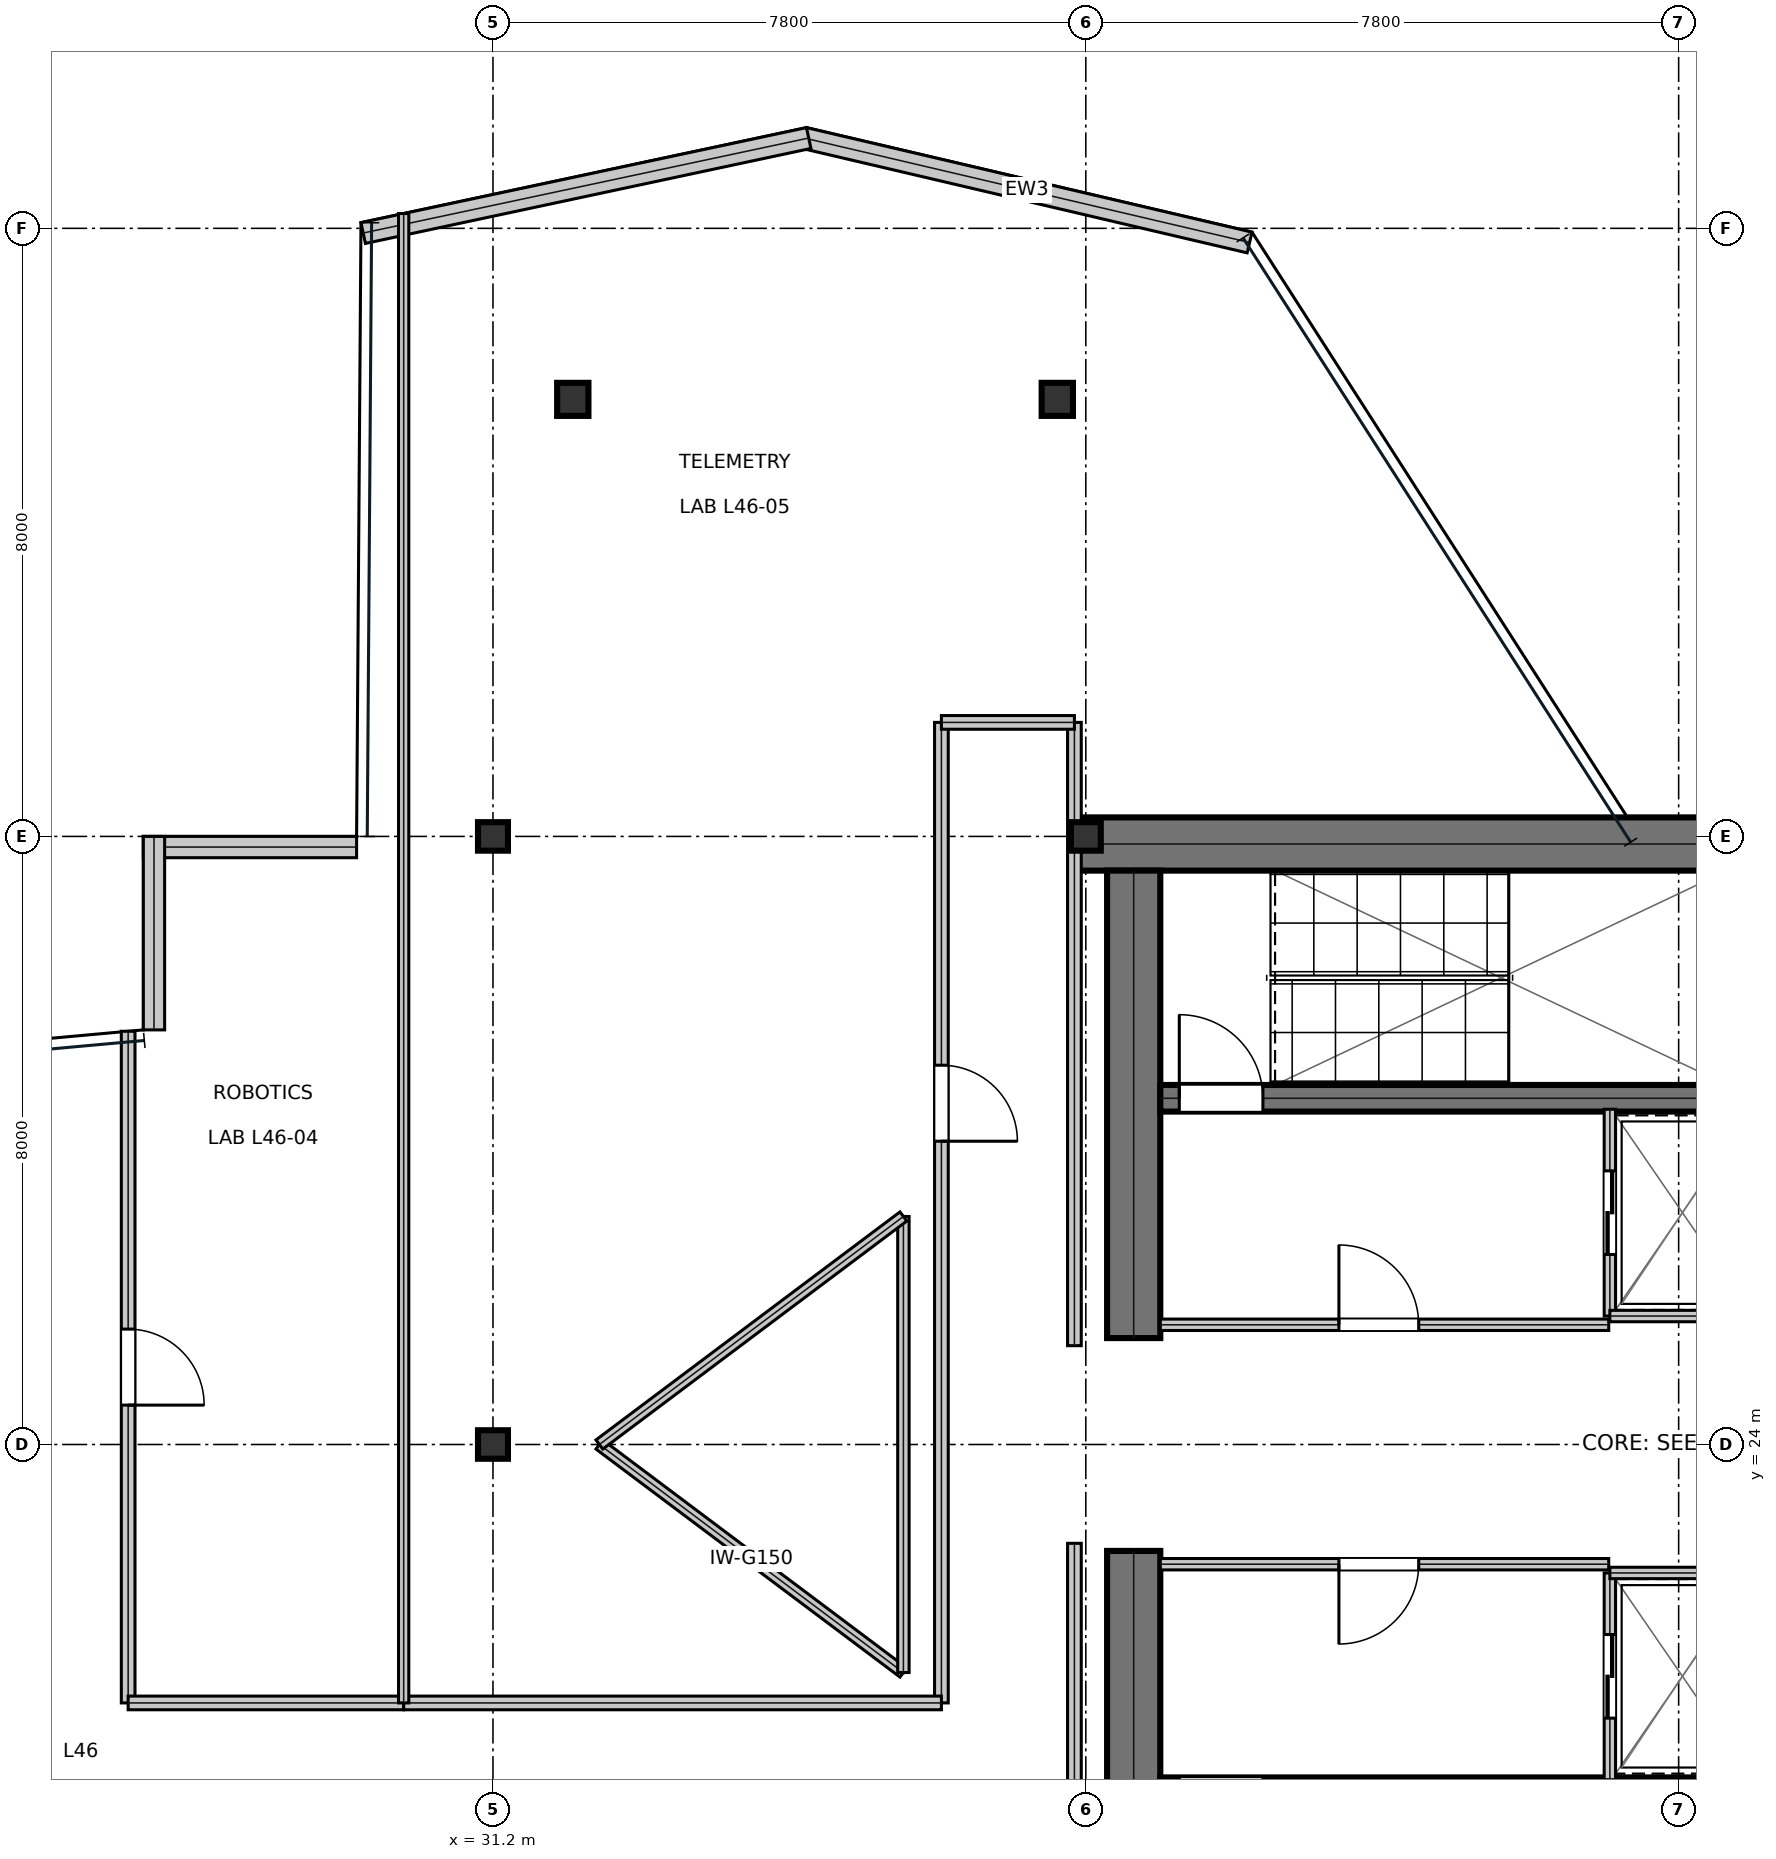
"""IFC4 building model, lengths in metres.
Left out: names, types, materials, properties, quantities, classifications, styles, units other than length and angle.
Written with IfcOpenShell. Run it as: python <this file> out.ifc"""

import sys

from ifc_helpers import new_model, si_unit, direction, frame, frame_2d, origin, origin_2d, place, context, subcontext, project, spatial, rectangle, i_section, extrude, element, fill, save


model = new_model("IFC4")
c1 = context("Model", 3, precision=1e-05, world=origin(), true_north=direction((0.0, 1.0)))
c2 = subcontext(c1, "Body", "Model", "MODEL_VIEW")
j1 = project(units=[si_unit("LENGTHUNIT", "METRE"), si_unit("PLANEANGLEUNIT", "RADIAN")], contexts=[c1])
p1 = place(None, origin())
s1 = spatial("IfcSite", under=j1, at=p1, CompositionType="ELEMENT")
p2 = place(p1, origin())
s2 = spatial("IfcBuilding", under=s1, at=p2, CompositionType="ELEMENT")
p3 = place(p2, frame((0.0, 0.0, 199.95)))
s3 = spatial("IfcBuildingStorey", under=s2, at=p3, CompositionType="ELEMENT", Elevation=199.95)
p4 = place(p3, frame((38.8, 31.9, 0.0), z_axis=(0.0, 0.0, 1.0), x_axis=(1.0, 0.0, 0.0)))
e1 = element("IfcWall", 1, at=p4, inside=s3, PredefinedType="SHEAR", context=c2, shape_type="SweptSolid", body=[
    extrude(rectangle(XDim=16.0, YDim=0.7, at=frame_2d((8.0, 0.0))), origin(), (0.0, 0.0, 1.0), 3.79),
])
for number, where, z_axis, x_axis in (
    (2, (39.63, 16.45, 0.0), (0.0, 0.0, 1.0), (0.0, 1.0, 0.0)),
    (3, (39.63, 25.4, 0.0), (0.0, 0.0, 1.0), (0.0, 1.0, 0.0)),
):
    element("IfcWall", number, at=place(p3, frame(where, z_axis=z_axis, x_axis=x_axis)), inside=s3, PredefinedType="SHEAR", context=c2, shape_type="SweptSolid", body=[
        extrude(rectangle(XDim=6.15, YDim=0.7, at=frame_2d((3.075, 0.0))), origin(), (0.0, 0.0, 1.0), 3.79),
    ])
p5 = place(p3, frame((39.98, 28.555, 0.0), z_axis=(0.0, 0.0, 1.0), x_axis=(1.0, 0.0, 0.0)))
e4 = element("IfcWall", 4, at=p5, inside=s3, PredefinedType="SHEAR", context=c2, shape_type="SweptSolid", body=[
    extrude(rectangle(XDim=7.71, YDim=0.35, at=frame_2d((3.855, 0.0))), origin(), (0.0, 0.0, 1.0), 3.79),
])
p6 = place(p5, frame((0.25, 0.0, 0.0)))
e5 = element("IfcOpeningElement", 5, at=p6, cuts=e4, PredefinedType="OPENING", context=c2, shape_type="SweptSolid", body=[
    extrude(rectangle(XDim=1.1, YDim=2.15, at=frame_2d((0.55, 1.075))), frame((0.0, 0.185, 0.0), z_axis=(0.0, -1.0, 0.0), x_axis=(1.0, 0.0, 0.0)), (0.0, 0.0, 1.0), 0.37),
])
p7 = place(p3, frame((39.98, 19.445, 0.0), z_axis=(0.0, 0.0, 1.0), x_axis=(1.0, 0.0, 0.0)))
e6 = element("IfcWall", 6, at=p7, inside=s3, PredefinedType="SHEAR", context=c2, shape_type="SweptSolid", body=[
    extrude(rectangle(XDim=7.71, YDim=0.35, at=frame_2d((3.855, 0.0))), origin(), (0.0, 0.0, 1.0), 3.79),
])
p8 = place(p7, frame((0.25, 0.0, 0.0)))
e7 = element("IfcOpeningElement", 7, at=p8, cuts=e6, PredefinedType="OPENING", context=c2, shape_type="SweptSolid", body=[
    extrude(rectangle(XDim=1.1, YDim=2.15, at=frame_2d((0.55, 1.075))), frame((0.0, 0.185, 0.0), z_axis=(0.0, -1.0, 0.0), x_axis=(1.0, 0.0, 0.0)), (0.0, 0.0, 1.0), 0.37),
])
for number, where, z_axis, x_axis in (
    (8, (31.2, 24.0, 0.0), (0.0, 0.0, 1.0), (1.0, 0.0, 0.0)),
    (9, (31.2, 32.0, 0.0), (0.0, 0.0, 1.0), (1.0, 0.0, 0.0)),
    (10, (39.0, 32.0, 0.0), (0.0, 0.0, 1.0), (1.0, 0.0, 0.0)),
):
    element("IfcColumn", number, at=place(p3, frame(where, z_axis=z_axis, x_axis=x_axis)), inside=s3, PredefinedType="COLUMN", context=c2, shape_type="SweptSolid", body=[
        extrude(i_section(OverallWidth=0.394, OverallDepth=0.375, WebThickness=0.017, FlangeThickness=0.028, at=origin_2d()), origin(), (0.0, 0.0, 1.0), 4.044),
    ])
p9 = place(p3, frame((32.25, 37.75, 0.016), z_axis=(0.017424616635, -0.037277751269, 0.999153017308), x_axis=(0.905919107853, 0.423450788199, 0.0)))
e11 = element("IfcColumn", 11, at=p9, inside=s3, PredefinedType="COLUMN", context=c2, shape_type="SweptSolid", body=[
    extrude(i_section(OverallWidth=0.412, OverallDepth=0.435, WebThickness=0.036, FlangeThickness=0.058, at=origin_2d()), origin(), (0.0, 0.0, 1.0), 4.021),
])
p10 = place(p3, frame((38.625, 37.75, 0.016), z_axis=(-0.006193542422, -0.03728269654, 0.999285565077), x_axis=(0.986480631929, -0.163877889995, 0.0)))
e12 = element("IfcColumn", 12, at=p10, inside=s3, PredefinedType="COLUMN", context=c2, shape_type="SweptSolid", body=[
    extrude(i_section(OverallWidth=0.412, OverallDepth=0.435, WebThickness=0.036, FlangeThickness=0.058, at=origin_2d()), origin(), (0.0, 0.0, 1.0), 4.021),
])
p11 = place(p3, frame((41.155, 39.814, 0.0), z_axis=(0.0, 0.0, 1.0), x_axis=(-0.973574347184, 0.228370292517, 0.0)))
e13 = element("IfcWall", 13, at=p11, inside=s3, PredefinedType="STANDARD", context=c2, shape_type="SweptSolid", body=[
    extrude(rectangle(XDim=6.021, YDim=0.28, at=frame_2d((3.01, 0.0))), origin(), (0.0, 0.0, 1.0), 3.79),
])
p12 = place(p3, frame((35.354, 41.188, 0.0), z_axis=(0.0, 0.0, 1.0), x_axis=(-0.978010564176, -0.208555355626, 0.0)))
e14 = element("IfcWall", 14, at=p12, inside=s3, PredefinedType="STANDARD", context=c2, shape_type="SweptSolid", body=[
    extrude(rectangle(XDim=5.994, YDim=0.28, at=frame_2d((2.997, 0.0))), origin(), (0.0, 0.0, 1.0), 3.79),
])
p13 = place(p3, frame((29.406, 31.86, 0.0), z_axis=(0.0, 0.0, 1.0), x_axis=(-1.0, 0.0, 0.0)))
e15 = element("IfcWall", 15, at=p13, inside=s3, PredefinedType="STANDARD", context=c2, shape_type="SweptSolid", body=[
    extrude(rectangle(XDim=2.806, YDim=0.28, at=frame_2d((1.403, 0.0))), origin(), (0.0, 0.0, 1.0), 3.79),
])
p14 = place(p3, frame((26.74, 32.0, 0.0), z_axis=(0.0, 0.0, 1.0), x_axis=(0.0, -1.0, 0.0)))
e16 = element("IfcWall", 16, at=p14, inside=s3, PredefinedType="STANDARD", context=c2, shape_type="SweptSolid", body=[
    extrude(rectangle(XDim=2.545, YDim=0.28, at=frame_2d((1.273, 0.0))), origin(), (0.0, 0.0, 1.0), 3.319),
])
p15 = place(p3, frame((39.98, 25.575, 0.0), z_axis=(0.0, 0.0, 1.0), x_axis=(1.0, 0.0, 0.0)))
e17 = element("IfcWall", 17, at=p15, inside=s3, PredefinedType="PARTITIONING", context=c2, shape_type="SweptSolid", body=[
    extrude(rectangle(XDim=5.9, YDim=0.15, at=frame_2d((2.95, 0.0))), origin(), (0.0, 0.0, 1.0), 3.79),
])
p16 = place(p15, frame((2.35, 0.0, 0.0)))
e18 = element("IfcOpeningElement", 18, at=p16, cuts=e17, PredefinedType="OPENING", context=c2, shape_type="SweptSolid", body=[
    extrude(rectangle(XDim=1.05, YDim=2.15, at=frame_2d((0.525, 1.075))), frame((0.0, 0.085, 0.0), z_axis=(0.0, -1.0, 0.0), x_axis=(1.0, 0.0, 0.0)), (0.0, 0.0, 1.0), 0.17),
])
p17 = place(p3, frame((39.98, 22.425, 0.0), z_axis=(0.0, 0.0, 1.0), x_axis=(1.0, 0.0, 0.0)))
e19 = element("IfcWall", 19, at=p17, inside=s3, PredefinedType="PARTITIONING", context=c2, shape_type="SweptSolid", body=[
    extrude(rectangle(XDim=5.9, YDim=0.15, at=frame_2d((2.95, 0.0))), origin(), (0.0, 0.0, 1.0), 3.79),
])
p18 = place(p17, frame((2.35, 0.0, 0.0)))
e20 = element("IfcOpeningElement", 20, at=p18, cuts=e19, PredefinedType="OPENING", context=c2, shape_type="SweptSolid", body=[
    extrude(rectangle(XDim=1.05, YDim=2.15, at=frame_2d((0.525, 1.075))), frame((0.0, 0.085, 0.0), z_axis=(0.0, -1.0, 0.0), x_axis=(1.0, 0.0, 0.0)), (0.0, 0.0, 1.0), 0.17),
])
p19 = place(p3, frame((45.895, 25.69, 0.0), z_axis=(0.0, 0.0, 1.0), x_axis=(0.0, 1.0, 0.0)))
e21 = element("IfcWall", 21, at=p19, inside=s3, PredefinedType="PARTITIONING", context=c2, shape_type="SweptSolid", body=[
    extrude(rectangle(XDim=2.72, YDim=0.15, at=frame_2d((1.36, 0.0))), origin(), (0.0, 0.0, 1.0), 3.79),
])
p20 = place(p19, frame((0.81, 0.0, 0.0)))
e22 = element("IfcOpeningElement", 22, at=p20, cuts=e21, PredefinedType="OPENING", context=c2, shape_type="SweptSolid", body=[
    extrude(rectangle(XDim=1.1, YDim=2.15, at=frame_2d((0.55, 1.075))), frame((0.0, 0.085, 0.0), z_axis=(0.0, -1.0, 0.0), x_axis=(1.0, 0.0, 0.0)), (0.0, 0.0, 1.0), 0.17),
])
p21 = place(p3, frame((45.895, 25.69, 0.0), z_axis=(0.0, 0.0, 1.0), x_axis=(1.0, 0.0, 0.0)))
e23 = element("IfcWall", 23, at=p21, inside=s3, PredefinedType="PARTITIONING", context=c2, shape_type="SweptSolid", body=[
    extrude(rectangle(XDim=1.915, YDim=0.15, at=frame_2d((0.958, 0.0))), origin(), (0.0, 0.0, 1.0), 3.79),
])
p22 = place(p3, frame((45.895, 19.59, 0.0), z_axis=(0.0, 0.0, 1.0), x_axis=(0.0, 1.0, 0.0)))
e24 = element("IfcWall", 24, at=p22, inside=s3, PredefinedType="PARTITIONING", context=c2, shape_type="SweptSolid", body=[
    extrude(rectangle(XDim=2.72, YDim=0.15, at=frame_2d((1.36, 0.0))), origin(), (0.0, 0.0, 1.0), 3.79),
])
p23 = place(p22, frame((0.81, 0.0, 0.0)))
e25 = element("IfcOpeningElement", 25, at=p23, cuts=e24, PredefinedType="OPENING", context=c2, shape_type="SweptSolid", body=[
    extrude(rectangle(XDim=1.1, YDim=2.15, at=frame_2d((0.55, 1.075))), frame((0.0, 0.085, 0.0), z_axis=(0.0, -1.0, 0.0), x_axis=(1.0, 0.0, 0.0)), (0.0, 0.0, 1.0), 0.17),
])
p24 = place(p3, frame((45.895, 22.31, 0.0), z_axis=(0.0, 0.0, 1.0), x_axis=(1.0, 0.0, 0.0)))
e26 = element("IfcWall", 26, at=p24, inside=s3, PredefinedType="PARTITIONING", context=c2, shape_type="SweptSolid", body=[
    extrude(rectangle(XDim=1.915, YDim=0.15, at=frame_2d((0.958, 0.0))), origin(), (0.0, 0.0, 1.0), 3.79),
])
p25 = place(p3, frame((26.4, 20.6, 0.0), z_axis=(0.0, 0.0, 1.0), x_axis=(0.0, 1.0, 0.0)))
e27 = element("IfcWall", 27, at=p25, inside=s3, PredefinedType="SOLIDWALL", context=c2, shape_type="SweptSolid", body=[
    extrude(rectangle(XDim=8.836, YDim=0.18, at=frame_2d((4.418, 0.0))), origin(), (0.0, 0.0, 1.0), 3.241),
])
p26 = place(p25, frame((3.918, 0.0, 0.0)))
e28 = element("IfcOpeningElement", 28, at=p26, cuts=e27, PredefinedType="OPENING", context=c2, shape_type="SweptSolid", body=[
    extrude(rectangle(XDim=1.0, YDim=2.15, at=frame_2d((0.5, 1.075))), frame((0.0, 0.1, 0.0), z_axis=(0.0, -1.0, 0.0), x_axis=(1.0, 0.0, 0.0)), (0.0, 0.0, 1.0), 0.2),
])
p27 = place(p3, frame((37.1, 20.6, 0.0), z_axis=(0.0, 0.0, 1.0), x_axis=(0.0, 1.0, 0.0)))
e29 = element("IfcWall", 29, at=p27, inside=s3, PredefinedType="SOLIDWALL", context=c2, shape_type="SweptSolid", body=[
    extrude(rectangle(XDim=12.9, YDim=0.18, at=frame_2d((6.45, 0.0))), origin(), (0.0, 0.0, 1.0), 3.241),
])
p28 = place(p27, frame((7.39, 0.0, 0.0)))
e30 = element("IfcOpeningElement", 30, at=p28, cuts=e29, PredefinedType="OPENING", context=c2, shape_type="SweptSolid", body=[
    extrude(rectangle(XDim=1.0, YDim=2.15, at=frame_2d((0.5, 1.075))), frame((0.0, 0.1, 0.0), z_axis=(0.0, -1.0, 0.0), x_axis=(1.0, 0.0, 0.0)), (0.0, 0.0, 1.0), 0.2),
])
p29 = place(p3, frame((38.85, 14.5, 0.0), z_axis=(0.0, 0.0, 1.0), x_axis=(0.0, 1.0, 0.0)))
e31 = element("IfcWall", 31, at=p29, inside=s3, PredefinedType="SOLIDWALL", context=c2, shape_type="SweptSolid", body=[
    extrude(rectangle(XDim=8.2, YDim=0.18, at=frame_2d((4.1, 0.0))), origin(), (0.0, 0.0, 1.0), 3.241),
])
p30 = place(p3, frame((26.4, 20.6, 0.0), z_axis=(0.0, 0.0, 1.0), x_axis=(1.0, 0.0, 0.0)))
e32 = element("IfcWall", 32, at=p30, inside=s3, PredefinedType="SOLIDWALL", context=c2, shape_type="SweptSolid", body=[
    extrude(rectangle(XDim=3.625, YDim=0.18, at=frame_2d((1.812, 0.0))), origin(), (0.0, 0.0, 1.0), 3.79),
])
p31 = place(p3, frame((38.85, 25.3, 0.0), z_axis=(0.0, 0.0, 1.0), x_axis=(0.0, 1.0, 0.0)))
e33 = element("IfcWall", 33, at=p31, inside=s3, PredefinedType="SOLIDWALL", context=c2, shape_type="SweptSolid", body=[
    extrude(rectangle(XDim=8.2, YDim=0.18, at=frame_2d((4.1, 0.0))), origin(), (0.0, 0.0, 1.0), 3.241),
])
p32 = place(p3, frame((30.025, 20.6, 0.0), z_axis=(0.0, 0.0, 1.0), x_axis=(1.0, 0.0, 0.0)))
e34 = element("IfcWall", 34, at=p32, inside=s3, PredefinedType="SOLIDWALL", context=c2, shape_type="SweptSolid", body=[
    extrude(rectangle(XDim=7.075, YDim=0.18, at=frame_2d((3.538, 0.0))), origin(), (0.0, 0.0, 1.0), 3.241),
])
p33 = place(p3, frame((37.1, 33.5, 0.0), z_axis=(0.0, 0.0, 1.0), x_axis=(1.0, 0.0, 0.0)))
e35 = element("IfcWall", 35, at=p33, inside=s3, PredefinedType="SOLIDWALL", context=c2, shape_type="SweptSolid", body=[
    extrude(rectangle(XDim=1.75, YDim=0.18, at=frame_2d((0.875, 0.0))), origin(), (0.0, 0.0, 1.0), 3.241),
])
p34 = place(p3, frame((30.025, 20.6, 0.0), z_axis=(0.0, 0.0, 1.0), x_axis=(0.0, 1.0, 0.0)))
e36 = element("IfcWall", 36, at=p34, inside=s3, PredefinedType="PARTITIONING", context=c2, shape_type="SweptSolid", body=[
    extrude(rectangle(XDim=19.595, YDim=0.135, at=frame_2d((9.797, 0.0))), origin(), (0.0, 0.0, 1.0), 3.241),
])
p35 = place(p3, frame((32.6, 24.0, 0.0), z_axis=(0.0, 0.0, 1.0), x_axis=(0.8, -0.6, 0.0)))
e37 = element("IfcWall", 37, at=p35, inside=s3, PredefinedType="MOVABLE", context=c2, shape_type="SweptSolid", body=[
    extrude(rectangle(XDim=5.0, YDim=0.15, at=frame_2d((2.5, 0.0))), origin(), (0.0, 0.0, 1.0), 3.79),
])
p36 = place(p3, frame((36.6, 21.0, 0.0), z_axis=(0.0, 0.0, 1.0), x_axis=(0.0, 1.0, 0.0)))
e38 = element("IfcWall", 38, at=p36, inside=s3, PredefinedType="MOVABLE", context=c2, shape_type="SweptSolid", body=[
    extrude(rectangle(XDim=6.0, YDim=0.15, at=frame_2d((3.0, 0.0))), origin(), (0.0, 0.0, 1.0), 3.79),
])
p37 = place(p3, frame((36.6, 27.0, 0.0), z_axis=(0.0, 0.0, 1.0), x_axis=(-0.8, -0.6, 0.0)))
e39 = element("IfcWall", 39, at=p37, inside=s3, PredefinedType="MOVABLE", context=c2, shape_type="SweptSolid", body=[
    extrude(rectangle(XDim=5.0, YDim=0.15, at=frame_2d((2.5, 0.0))), origin(), (0.0, 0.0, 1.0), 3.79),
])
p38 = place(p16, origin())
e40 = element("IfcDoor", 40, at=p38, inside=s3, OperationType="SINGLE_SWING_LEFT", PredefinedType="DOOR", context=c2, shape_type="SweptSolid", body=[
    extrude(rectangle(XDim=1.05, YDim=2.15, at=frame_2d((0.525, 1.075))), frame((0.0, 0.025, 0.0), z_axis=(0.0, -1.0, 0.0), x_axis=(1.0, 0.0, 0.0)), (0.0, 0.0, 1.0), 0.05),
])
fill(e18, e40)
p39 = place(p18, frame((1.05, 0.0, 0.0), z_axis=(0.0, 0.0, 1.0), x_axis=(-1.0, 0.0, 0.0)))
e41 = element("IfcDoor", 41, at=p39, inside=s3, OperationType="SINGLE_SWING_RIGHT", PredefinedType="DOOR", context=c2, shape_type="SweptSolid", body=[
    extrude(rectangle(XDim=1.05, YDim=2.15, at=frame_2d((0.525, 1.075))), frame((0.0, 0.025, 0.0), z_axis=(0.0, -1.0, 0.0), x_axis=(1.0, 0.0, 0.0)), (0.0, 0.0, 1.0), 0.05),
])
fill(e20, e41)
p40 = place(p20, frame((1.1, 0.0, 0.0), z_axis=(0.0, 0.0, 1.0), x_axis=(-1.0, 0.0, 0.0)))
e42 = element("IfcDoor", 42, at=p40, inside=s3, OperationType="DOUBLE_DOOR_SLIDING", PredefinedType="DOOR", context=c2, shape_type="SweptSolid", body=[
    extrude(rectangle(XDim=1.1, YDim=2.15, at=frame_2d((0.55, 1.075))), frame((0.0, 0.025, 0.0), z_axis=(0.0, -1.0, 0.0), x_axis=(1.0, 0.0, 0.0)), (0.0, 0.0, 1.0), 0.05),
])
fill(e22, e42)
p41 = place(p23, frame((1.1, 0.0, 0.0), z_axis=(0.0, 0.0, 1.0), x_axis=(-1.0, 0.0, 0.0)))
e43 = element("IfcDoor", 43, at=p41, inside=s3, OperationType="DOUBLE_DOOR_SLIDING", PredefinedType="DOOR", context=c2, shape_type="SweptSolid", body=[
    extrude(rectangle(XDim=1.1, YDim=2.15, at=frame_2d((0.55, 1.075))), frame((0.0, 0.025, 0.0), z_axis=(0.0, -1.0, 0.0), x_axis=(1.0, 0.0, 0.0)), (0.0, 0.0, 1.0), 0.05),
])
fill(e25, e43)
p42 = place(p26, frame((1.0, 0.0, 0.0), z_axis=(0.0, 0.0, 1.0), x_axis=(-1.0, 0.0, 0.0)))
e44 = element("IfcDoor", 44, at=p42, inside=s3, OperationType="SINGLE_SWING_RIGHT", PredefinedType="DOOR", context=c2, shape_type="SweptSolid", body=[
    extrude(rectangle(XDim=1.0, YDim=2.15, at=frame_2d((0.5, 1.075))), frame((0.0, 0.025, 0.0), z_axis=(0.0, -1.0, 0.0), x_axis=(1.0, 0.0, 0.0)), (0.0, 0.0, 1.0), 0.05),
])
fill(e28, e44)
p43 = place(p28, frame((1.0, 0.0, 0.0), z_axis=(0.0, 0.0, 1.0), x_axis=(-1.0, 0.0, 0.0)))
e45 = element("IfcDoor", 45, at=p43, inside=s3, OperationType="SINGLE_SWING_RIGHT", PredefinedType="DOOR", context=c2, shape_type="SweptSolid", body=[
    extrude(rectangle(XDim=1.0, YDim=2.15, at=frame_2d((0.5, 1.075))), frame((0.0, 0.025, 0.0), z_axis=(0.0, -1.0, 0.0), x_axis=(1.0, 0.0, 0.0)), (0.0, 0.0, 1.0), 0.05),
])
fill(e30, e45)
p44 = place(p6, origin())
e46 = element("IfcDoor", 46, at=p44, inside=s3, OperationType="SINGLE_SWING_LEFT", PredefinedType="DOOR", context=c2, shape_type="SweptSolid", body=[
    extrude(rectangle(XDim=1.1, YDim=2.15, at=frame_2d((0.55, 1.075))), frame((0.0, 0.025, 0.0), z_axis=(0.0, -1.0, 0.0), x_axis=(1.0, 0.0, 0.0)), (0.0, 0.0, 1.0), 0.05),
])
fill(e5, e46)
save(model, sys.argv[1])
